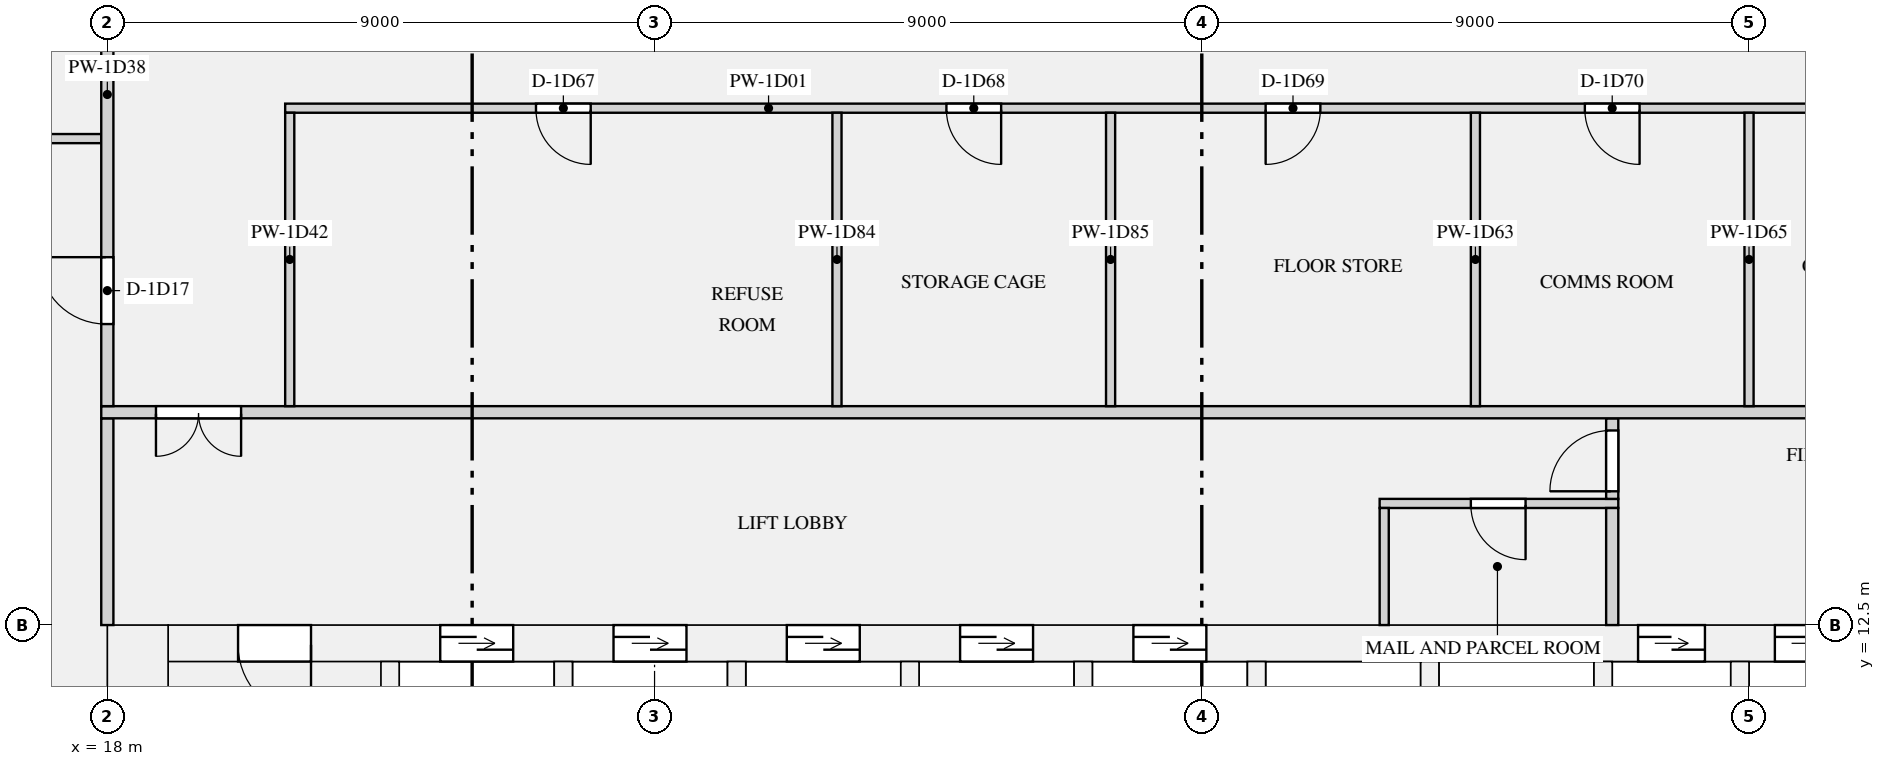
"""IFC4 building model, lengths in metres.
Left out: names, types, materials, properties, quantities, classifications, styles, units other than length and angle.
Written with IfcOpenShell. Run it as: python <this file> out.ifc"""

import sys

from ifc_helpers import new_model, si_unit, direction, frame, frame_2d, origin, place, context, subcontext, project, spatial, rectangle, extrude, element, fill, save


model = new_model("IFC4")
c1 = context("Model", 3, precision=1e-05, world=origin(), true_north=direction((0.0, 1.0)))
c2 = subcontext(c1, "Body", "Model", "MODEL_VIEW")
j1 = project(units=[si_unit("LENGTHUNIT", "METRE"), si_unit("PLANEANGLEUNIT", "RADIAN")], contexts=[c1])
p1 = place(None, origin())
s1 = spatial("IfcSite", under=j1, at=p1, CompositionType="ELEMENT")
p2 = place(p1, origin())
s2 = spatial("IfcBuilding", under=s1, at=p2, CompositionType="ELEMENT")
p3 = place(p2, frame((0.0, 0.0, 47.85)))
s3 = spatial("IfcBuildingStorey", under=s2, at=p3, CompositionType="ELEMENT", Elevation=47.85)
p4 = place(p3, frame((18.5, 0.0, 0.0), z_axis=(0.0, 0.0, 1.0), x_axis=(0.0, 1.0, 0.0)))
e1 = element("IfcWall", 1, at=p4, inside=s3, PredefinedType="SHEAR", context=c2, shape_type="SweptSolid", body=[
    extrude(rectangle(XDim=12.5, YDim=1.0, at=frame_2d((6.25, 0.0))), origin(), (0.0, 0.0, 1.0), 3.15),
])
p5 = place(p3, frame((19.0, 12.2, 0.0), z_axis=(0.0, 0.0, 1.0), x_axis=(1.0, 0.0, 0.0)))
e2 = element("IfcWall", 2, at=p5, inside=s3, PredefinedType="SHEAR", context=c2, shape_type="SweptSolid", body=[
    extrude(rectangle(XDim=34.0, YDim=0.6, at=frame_2d((17.0, 0.0))), origin(), (0.0, 0.0, 1.0), 3.15),
])
p6 = place(p5, frame((4.475, 0.0, 0.0)))
e3 = element("IfcOpeningElement", 3, at=p6, cuts=e2, PredefinedType="OPENING", context=c2, shape_type="SweptSolid", body=[
    extrude(rectangle(XDim=1.2, YDim=2.1, at=frame_2d((0.6, 1.05))), frame((0.0, 0.31, 0.0), z_axis=(0.0, -1.0, 0.0), x_axis=(1.0, 0.0, 0.0)), (0.0, 0.0, 1.0), 0.62),
])
p7 = place(p5, frame((7.325, 0.0, 0.0)))
e4 = element("IfcOpeningElement", 4, at=p7, cuts=e2, PredefinedType="OPENING", context=c2, shape_type="SweptSolid", body=[
    extrude(rectangle(XDim=1.2, YDim=2.1, at=frame_2d((0.6, 1.05))), frame((0.0, 0.31, 0.0), z_axis=(0.0, -1.0, 0.0), x_axis=(1.0, 0.0, 0.0)), (0.0, 0.0, 1.0), 0.62),
])
p8 = place(p5, frame((10.175, 0.0, 0.0)))
e5 = element("IfcOpeningElement", 5, at=p8, cuts=e2, PredefinedType="OPENING", context=c2, shape_type="SweptSolid", body=[
    extrude(rectangle(XDim=1.2, YDim=2.1, at=frame_2d((0.6, 1.05))), frame((0.0, 0.31, 0.0), z_axis=(0.0, -1.0, 0.0), x_axis=(1.0, 0.0, 0.0)), (0.0, 0.0, 1.0), 0.62),
])
p9 = place(p5, frame((13.025, 0.0, 0.0)))
e6 = element("IfcOpeningElement", 6, at=p9, cuts=e2, PredefinedType="OPENING", context=c2, shape_type="SweptSolid", body=[
    extrude(rectangle(XDim=1.2, YDim=2.1, at=frame_2d((0.6, 1.05))), frame((0.0, 0.31, 0.0), z_axis=(0.0, -1.0, 0.0), x_axis=(1.0, 0.0, 0.0)), (0.0, 0.0, 1.0), 0.62),
])
p10 = place(p5, frame((15.875, 0.0, 0.0)))
e7 = element("IfcOpeningElement", 7, at=p10, cuts=e2, PredefinedType="OPENING", context=c2, shape_type="SweptSolid", body=[
    extrude(rectangle(XDim=1.2, YDim=2.1, at=frame_2d((0.6, 1.05))), frame((0.0, 0.31, 0.0), z_axis=(0.0, -1.0, 0.0), x_axis=(1.0, 0.0, 0.0)), (0.0, 0.0, 1.0), 0.62),
])
p11 = place(p5, frame((24.175, 0.0, 0.0)))
e8 = element("IfcOpeningElement", 8, at=p11, cuts=e2, PredefinedType="OPENING", context=c2, shape_type="SweptSolid", body=[
    extrude(rectangle(XDim=1.1, YDim=2.1, at=frame_2d((0.55, 1.05))), frame((0.0, 0.31, 0.0), z_axis=(0.0, -1.0, 0.0), x_axis=(1.0, 0.0, 0.0)), (0.0, 0.0, 1.0), 0.62),
])
p12 = place(p5, frame((26.425, 0.0, 0.0)))
e9 = element("IfcOpeningElement", 9, at=p12, cuts=e2, PredefinedType="OPENING", context=c2, shape_type="SweptSolid", body=[
    extrude(rectangle(XDim=1.1, YDim=2.1, at=frame_2d((0.55, 1.05))), frame((0.0, 0.31, 0.0), z_axis=(0.0, -1.0, 0.0), x_axis=(1.0, 0.0, 0.0)), (0.0, 0.0, 1.0), 0.62),
])
p13 = place(p5, frame((28.675, 0.0, 0.0)))
e10 = element("IfcOpeningElement", 10, at=p13, cuts=e2, PredefinedType="OPENING", context=c2, shape_type="SweptSolid", body=[
    extrude(rectangle(XDim=1.1, YDim=2.1, at=frame_2d((0.55, 1.05))), frame((0.0, 0.31, 0.0), z_axis=(0.0, -1.0, 0.0), x_axis=(1.0, 0.0, 0.0)), (0.0, 0.0, 1.0), 0.62),
])
p14 = place(p5, frame((1.15, 0.0, 0.0)))
e11 = element("IfcOpeningElement", 11, at=p14, cuts=e2, PredefinedType="OPENING", context=c2, shape_type="SweptSolid", body=[
    extrude(rectangle(XDim=1.2, YDim=2.1, at=frame_2d((0.6, 1.05))), frame((0.0, 0.31, 0.0), z_axis=(0.0, -1.0, 0.0), x_axis=(1.0, 0.0, 0.0)), (0.0, 0.0, 1.0), 0.62),
])
p15 = place(p5, frame((31.65, 0.0, 0.0)))
e12 = element("IfcOpeningElement", 12, at=p15, cuts=e2, PredefinedType="OPENING", context=c2, shape_type="SweptSolid", body=[
    extrude(rectangle(XDim=1.2, YDim=2.1, at=frame_2d((0.6, 1.05))), frame((0.0, 0.31, 0.0), z_axis=(0.0, -1.0, 0.0), x_axis=(1.0, 0.0, 0.0)), (0.0, 0.0, 1.0), 0.62),
])
for number, where, z_axis, x_axis in (
    (13, (22.65, 9.35, 0.0), (0.0, 0.0, 1.0), (0.0, 1.0, 0.0)),
    (14, (25.5, 9.35, 0.0), (0.0, 0.0, 1.0), (0.0, 1.0, 0.0)),
    (15, (28.35, 9.35, 0.0), (0.0, 0.0, 1.0), (0.0, 1.0, 0.0)),
    (16, (31.2, 9.35, 0.0), (0.0, 0.0, 1.0), (0.0, 1.0, 0.0)),
    (17, (34.05, 9.35, 0.0), (0.0, 0.0, 1.0), (0.0, 1.0, 0.0)),
    (18, (36.9, 9.35, 0.0), (0.0, 0.0, 1.0), (0.0, 1.0, 0.0)),
    (19, (39.75, 9.35, 0.0), (0.0, 0.0, 1.0), (0.0, 1.0, 0.0)),
):
    element("IfcWall", number, at=place(p3, frame(where, z_axis=z_axis, x_axis=x_axis)), inside=s3, PredefinedType="SHEAR", context=c2, shape_type="SweptSolid", body=[
        extrude(rectangle(XDim=2.55, YDim=0.3, at=frame_2d((1.275, 0.0))), origin(), (0.0, 0.0, 1.0), 3.15),
    ])
for number, where, z_axis, x_axis in (
    (20, (42.6, 8.25, 0.0), (0.0, 0.0, 1.0), (0.0, 1.0, 0.0)),
    (21, (44.85, 8.25, 0.0), (0.0, 0.0, 1.0), (0.0, 1.0, 0.0)),
):
    element("IfcWall", number, at=place(p3, frame(where, z_axis=z_axis, x_axis=x_axis)), inside=s3, PredefinedType="SHEAR", context=c2, shape_type="SweptSolid", body=[
        extrude(rectangle(XDim=3.65, YDim=0.3, at=frame_2d((1.825, 0.0))), origin(), (0.0, 0.0, 1.0), 3.15),
    ])
p16 = place(p3, frame((38.925, 14.5, 0.0), z_axis=(0.0, 0.0, 1.0), x_axis=(1.0, 0.0, 0.0)))
e22 = element("IfcWall", 22, at=p16, inside=s3, PredefinedType="PARTITIONING", context=c2, shape_type="SweptSolid", body=[
    extrude(rectangle(XDim=3.925, YDim=0.15, at=frame_2d((1.962, 0.0))), origin(), (0.0, 0.0, 1.0), 2.83),
])
p17 = place(p16, frame((1.5, 0.0, 0.0)))
e23 = element("IfcOpeningElement", 23, at=p17, cuts=e22, PredefinedType="OPENING", context=c2, shape_type="SweptSolid", body=[
    extrude(rectangle(XDim=0.9, YDim=2.1, at=frame_2d((0.45, 1.05))), frame((0.0, 0.085, 0.0), z_axis=(0.0, -1.0, 0.0), x_axis=(1.0, 0.0, 0.0)), (0.0, 0.0, 1.0), 0.17),
])
p18 = place(p3, frame((18.0, 12.5, 0.0), z_axis=(0.0, 0.0, 1.0), x_axis=(0.0, 1.0, 0.0)))
e24 = element("IfcWall", 24, at=p18, inside=s3, PredefinedType="PARTITIONING", context=c2, shape_type="SweptSolid", body=[
    extrude(rectangle(XDim=3.4, YDim=0.2, at=frame_2d((1.7, 0.0))), origin(), (0.0, 0.0, 1.0), 2.83),
])
p19 = place(p3, frame((39.0, 12.5, 0.0), z_axis=(0.0, 0.0, 1.0), x_axis=(0.0, 1.0, 0.0)))
e25 = element("IfcWall", 25, at=p19, inside=s3, PredefinedType="PARTITIONING", context=c2, shape_type="SweptSolid", body=[
    extrude(rectangle(XDim=1.925, YDim=0.15, at=frame_2d((0.962, 0.0))), origin(), (0.0, 0.0, 1.0), 2.83),
])
p20 = place(p3, frame((42.75, 12.5, 0.0), z_axis=(0.0, 0.0, 1.0), x_axis=(0.0, 1.0, 0.0)))
e26 = element("IfcWall", 26, at=p20, inside=s3, PredefinedType="PARTITIONING", context=c2, shape_type="SweptSolid", body=[
    extrude(rectangle(XDim=1.925, YDim=0.2, at=frame_2d((0.962, 0.0))), origin(), (0.0, 0.0, 1.0), 2.83),
])
p21 = place(p3, frame((42.75, 14.575, 0.0), z_axis=(0.0, 0.0, 1.0), x_axis=(0.0, 1.0, 0.0)))
e27 = element("IfcWall", 27, at=p21, inside=s3, PredefinedType="PARTITIONING", context=c2, shape_type="SweptSolid", body=[
    extrude(rectangle(XDim=1.325, YDim=0.2, at=frame_2d((0.663, 0.0))), origin(), (0.0, 0.0, 1.0), 2.83),
])
p22 = place(p21, frame((0.125, 0.0, 0.0)))
e28 = element("IfcOpeningElement", 28, at=p22, cuts=e27, PredefinedType="OPENING", context=c2, shape_type="SweptSolid", body=[
    extrude(rectangle(XDim=1.0, YDim=2.1, at=frame_2d((0.5, 1.05))), frame((0.0, 0.11, 0.0), z_axis=(0.0, -1.0, 0.0), x_axis=(1.0, 0.0, 0.0)), (0.0, 0.0, 1.0), 0.22),
])
p23 = place(p3, frame((20.925, 21.0, 0.0), z_axis=(0.0, 0.0, 1.0), x_axis=(1.0, 0.0, 0.0)))
e29 = element("IfcWall", 29, at=p23, inside=s3, PredefinedType="PARTITIONING", context=c2, shape_type="SweptSolid", body=[
    extrude(rectangle(XDim=30.15, YDim=0.15, at=frame_2d((15.075, 0.0))), origin(), (0.0, 0.0, 1.0), 2.83),
])
p24 = place(p23, frame((4.125, 0.0, 0.0)))
e30 = element("IfcOpeningElement", 30, at=p24, cuts=e29, PredefinedType="OPENING", context=c2, shape_type="SweptSolid", body=[
    extrude(rectangle(XDim=0.9, YDim=2.1, at=frame_2d((0.45, 1.05))), frame((0.0, 0.085, 0.0), z_axis=(0.0, -1.0, 0.0), x_axis=(1.0, 0.0, 0.0)), (0.0, 0.0, 1.0), 0.17),
])
p25 = place(p23, frame((10.875, 0.0, 0.0)))
e31 = element("IfcOpeningElement", 31, at=p25, cuts=e29, PredefinedType="OPENING", context=c2, shape_type="SweptSolid", body=[
    extrude(rectangle(XDim=0.9, YDim=2.1, at=frame_2d((0.45, 1.05))), frame((0.0, 0.085, 0.0), z_axis=(0.0, -1.0, 0.0), x_axis=(1.0, 0.0, 0.0)), (0.0, 0.0, 1.0), 0.17),
])
p26 = place(p23, frame((16.125, 0.0, 0.0)))
e32 = element("IfcOpeningElement", 32, at=p26, cuts=e29, PredefinedType="OPENING", context=c2, shape_type="SweptSolid", body=[
    extrude(rectangle(XDim=0.9, YDim=2.1, at=frame_2d((0.45, 1.05))), frame((0.0, 0.085, 0.0), z_axis=(0.0, -1.0, 0.0), x_axis=(1.0, 0.0, 0.0)), (0.0, 0.0, 1.0), 0.17),
])
p27 = place(p23, frame((21.375, 0.0, 0.0)))
e33 = element("IfcOpeningElement", 33, at=p27, cuts=e29, PredefinedType="OPENING", context=c2, shape_type="SweptSolid", body=[
    extrude(rectangle(XDim=0.9, YDim=2.1, at=frame_2d((0.45, 1.05))), frame((0.0, 0.085, 0.0), z_axis=(0.0, -1.0, 0.0), x_axis=(1.0, 0.0, 0.0)), (0.0, 0.0, 1.0), 0.17),
])
p28 = place(p23, frame((26.625, 0.0, 0.0)))
e34 = element("IfcOpeningElement", 34, at=p28, cuts=e29, PredefinedType="OPENING", context=c2, shape_type="SweptSolid", body=[
    extrude(rectangle(XDim=0.9, YDim=2.1, at=frame_2d((0.45, 1.05))), frame((0.0, 0.085, 0.0), z_axis=(0.0, -1.0, 0.0), x_axis=(1.0, 0.0, 0.0)), (0.0, 0.0, 1.0), 0.17),
])
p29 = place(p3, frame((13.425, 20.5, 0.0), z_axis=(0.0, 0.0, 1.0), x_axis=(1.0, 0.0, 0.0)))
e35 = element("IfcWall", 35, at=p29, inside=s3, PredefinedType="PARTITIONING", context=c2, shape_type="SweptSolid", body=[
    extrude(rectangle(XDim=4.475, YDim=0.15, at=frame_2d((2.237, 0.0))), origin(), (0.0, 0.0, 1.0), 2.83),
])
p30 = place(p29, frame((1.875, 0.0, 0.0)))
e36 = element("IfcOpeningElement", 36, at=p30, cuts=e35, PredefinedType="OPENING", context=c2, shape_type="SweptSolid", body=[
    extrude(rectangle(XDim=0.9, YDim=2.1, at=frame_2d((0.45, 1.05))), frame((0.0, 0.085, 0.0), z_axis=(0.0, -1.0, 0.0), x_axis=(1.0, 0.0, 0.0)), (0.0, 0.0, 1.0), 0.17),
])
p31 = place(p3, frame((17.9, 16.0, 0.0), z_axis=(0.0, 0.0, 1.0), x_axis=(1.0, 0.0, 0.0)))
e37 = element("IfcWall", 37, at=p31, inside=s3, PredefinedType="PARTITIONING", context=c2, shape_type="SweptSolid", body=[
    extrude(rectangle(XDim=36.2, YDim=0.2, at=frame_2d((18.1, 0.0))), origin(), (0.0, 0.0, 1.0), 2.83),
])
p32 = place(p31, frame((0.9, 0.0, 0.0)))
e38 = element("IfcOpeningElement", 38, at=p32, cuts=e37, PredefinedType="OPENING", context=c2, shape_type="SweptSolid", body=[
    extrude(rectangle(XDim=1.4, YDim=2.1, at=frame_2d((0.7, 1.05))), frame((0.0, 0.11, 0.0), z_axis=(0.0, -1.0, 0.0), x_axis=(1.0, 0.0, 0.0)), (0.0, 0.0, 1.0), 0.22),
])
p33 = place(p31, frame((33.9, 0.0, 0.0)))
e39 = element("IfcOpeningElement", 39, at=p33, cuts=e37, PredefinedType="OPENING", context=c2, shape_type="SweptSolid", body=[
    extrude(rectangle(XDim=1.4, YDim=2.1, at=frame_2d((0.7, 1.05))), frame((0.0, 0.11, 0.0), z_axis=(0.0, -1.0, 0.0), x_axis=(1.0, 0.0, 0.0)), (0.0, 0.0, 1.0), 0.22),
])
p34 = place(p3, frame((18.0, 16.1, 0.0), z_axis=(0.0, 0.0, 1.0), x_axis=(0.0, 1.0, 0.0)))
e40 = element("IfcWall", 40, at=p34, inside=s3, PredefinedType="PARTITIONING", context=c2, shape_type="SweptSolid", body=[
    extrude(rectangle(XDim=7.8, YDim=0.2, at=frame_2d((3.9, 0.0))), origin(), (0.0, 0.0, 1.0), 2.83),
])
p35 = place(p34, frame((1.35, 0.0, 0.0)))
e41 = element("IfcOpeningElement", 41, at=p35, cuts=e40, PredefinedType="OPENING", context=c2, shape_type="SweptSolid", body=[
    extrude(rectangle(XDim=1.1, YDim=2.1, at=frame_2d((0.55, 1.05))), frame((0.0, 0.11, 0.0), z_axis=(0.0, -1.0, 0.0), x_axis=(1.0, 0.0, 0.0)), (0.0, 0.0, 1.0), 0.22),
])
for number, where, z_axis, x_axis in (
    (42, (21.0, 16.1, 0.0), (0.0, 0.0, 1.0), (0.0, 1.0, 0.0)),
    (43, (40.5, 16.1, 0.0), (0.0, 0.0, 1.0), (0.0, 1.0, 0.0)),
    (44, (45.0, 16.1, 0.0), (0.0, 0.0, 1.0), (0.0, 1.0, 0.0)),
    (45, (30.0, 16.1, 0.0), (0.0, 0.0, 1.0), (0.0, 1.0, 0.0)),
    (46, (34.5, 16.1, 0.0), (0.0, 0.0, 1.0), (0.0, 1.0, 0.0)),
):
    element("IfcWall", number, at=place(p3, frame(where, z_axis=z_axis, x_axis=x_axis)), inside=s3, PredefinedType="PARTITIONING", context=c2, shape_type="SweptSolid", body=[
        extrude(rectangle(XDim=4.825, YDim=0.15, at=frame_2d((2.413, 0.0))), origin(), (0.0, 0.0, 1.0), 2.83),
    ])
p36 = place(p6, origin())
e47 = element("IfcDoor", 47, at=p36, inside=s3, OperationType="DOUBLE_DOOR_SLIDING", PredefinedType="DOOR", context=c2, shape_type="SweptSolid", body=[
    extrude(rectangle(XDim=1.2, YDim=2.1, at=frame_2d((0.6, 1.05))), frame((0.0, 0.025, 0.0), z_axis=(0.0, -1.0, 0.0), x_axis=(1.0, 0.0, 0.0)), (0.0, 0.0, 1.0), 0.05),
])
fill(e3, e47)
p37 = place(p7, origin())
e48 = element("IfcDoor", 48, at=p37, inside=s3, OperationType="DOUBLE_DOOR_SLIDING", PredefinedType="DOOR", context=c2, shape_type="SweptSolid", body=[
    extrude(rectangle(XDim=1.2, YDim=2.1, at=frame_2d((0.6, 1.05))), frame((0.0, 0.025, 0.0), z_axis=(0.0, -1.0, 0.0), x_axis=(1.0, 0.0, 0.0)), (0.0, 0.0, 1.0), 0.05),
])
fill(e4, e48)
p38 = place(p8, origin())
e49 = element("IfcDoor", 49, at=p38, inside=s3, OperationType="DOUBLE_DOOR_SLIDING", PredefinedType="DOOR", context=c2, shape_type="SweptSolid", body=[
    extrude(rectangle(XDim=1.2, YDim=2.1, at=frame_2d((0.6, 1.05))), frame((0.0, 0.025, 0.0), z_axis=(0.0, -1.0, 0.0), x_axis=(1.0, 0.0, 0.0)), (0.0, 0.0, 1.0), 0.05),
])
fill(e5, e49)
p39 = place(p9, origin())
e50 = element("IfcDoor", 50, at=p39, inside=s3, OperationType="DOUBLE_DOOR_SLIDING", PredefinedType="DOOR", context=c2, shape_type="SweptSolid", body=[
    extrude(rectangle(XDim=1.2, YDim=2.1, at=frame_2d((0.6, 1.05))), frame((0.0, 0.025, 0.0), z_axis=(0.0, -1.0, 0.0), x_axis=(1.0, 0.0, 0.0)), (0.0, 0.0, 1.0), 0.05),
])
fill(e6, e50)
p40 = place(p10, origin())
e51 = element("IfcDoor", 51, at=p40, inside=s3, OperationType="DOUBLE_DOOR_SLIDING", PredefinedType="DOOR", context=c2, shape_type="SweptSolid", body=[
    extrude(rectangle(XDim=1.2, YDim=2.1, at=frame_2d((0.6, 1.05))), frame((0.0, 0.025, 0.0), z_axis=(0.0, -1.0, 0.0), x_axis=(1.0, 0.0, 0.0)), (0.0, 0.0, 1.0), 0.05),
])
fill(e7, e51)
p41 = place(p11, origin())
e52 = element("IfcDoor", 52, at=p41, inside=s3, OperationType="DOUBLE_DOOR_SLIDING", PredefinedType="DOOR", context=c2, shape_type="SweptSolid", body=[
    extrude(rectangle(XDim=1.1, YDim=2.1, at=frame_2d((0.55, 1.05))), frame((0.0, 0.025, 0.0), z_axis=(0.0, -1.0, 0.0), x_axis=(1.0, 0.0, 0.0)), (0.0, 0.0, 1.0), 0.05),
])
fill(e8, e52)
p42 = place(p12, origin())
e53 = element("IfcDoor", 53, at=p42, inside=s3, OperationType="DOUBLE_DOOR_SLIDING", PredefinedType="DOOR", context=c2, shape_type="SweptSolid", body=[
    extrude(rectangle(XDim=1.1, YDim=2.1, at=frame_2d((0.55, 1.05))), frame((0.0, 0.025, 0.0), z_axis=(0.0, -1.0, 0.0), x_axis=(1.0, 0.0, 0.0)), (0.0, 0.0, 1.0), 0.05),
])
fill(e9, e53)
p43 = place(p17, frame((0.9, 0.0, 0.0), z_axis=(0.0, 0.0, 1.0), x_axis=(-1.0, 0.0, 0.0)))
e54 = element("IfcDoor", 54, at=p43, inside=s3, OperationType="SINGLE_SWING_LEFT", PredefinedType="DOOR", context=c2, shape_type="SweptSolid", body=[
    extrude(rectangle(XDim=0.9, YDim=2.1, at=frame_2d((0.45, 1.05))), frame((0.0, 0.025, 0.0), z_axis=(0.0, -1.0, 0.0), x_axis=(1.0, 0.0, 0.0)), (0.0, 0.0, 1.0), 0.05),
])
fill(e23, e54)
p44 = place(p14, frame((1.2, 0.0, 0.0), z_axis=(0.0, 0.0, 1.0), x_axis=(-1.0, 0.0, 0.0)))
e55 = element("IfcDoor", 55, at=p44, inside=s3, OperationType="SINGLE_SWING_LEFT", PredefinedType="DOOR", context=c2, shape_type="SweptSolid", body=[
    extrude(rectangle(XDim=1.2, YDim=2.1, at=frame_2d((0.6, 1.05))), frame((0.0, 0.025, 0.0), z_axis=(0.0, -1.0, 0.0), x_axis=(1.0, 0.0, 0.0)), (0.0, 0.0, 1.0), 0.05),
])
fill(e11, e55)
p45 = place(p22, origin())
e56 = element("IfcDoor", 56, at=p45, inside=s3, OperationType="SINGLE_SWING_LEFT", PredefinedType="DOOR", context=c2, shape_type="SweptSolid", body=[
    extrude(rectangle(XDim=1.0, YDim=2.1, at=frame_2d((0.5, 1.05))), frame((0.0, 0.025, 0.0), z_axis=(0.0, -1.0, 0.0), x_axis=(1.0, 0.0, 0.0)), (0.0, 0.0, 1.0), 0.05),
])
fill(e28, e56)
p46 = place(p32, frame((1.4, 0.0, 0.0), z_axis=(0.0, 0.0, 1.0), x_axis=(-1.0, 0.0, 0.0)))
e57 = element("IfcDoor", 57, at=p46, inside=s3, OperationType="DOUBLE_DOOR_SINGLE_SWING", PredefinedType="DOOR", context=c2, shape_type="SweptSolid", body=[
    extrude(rectangle(XDim=1.4, YDim=2.1, at=frame_2d((0.7, 1.05))), frame((0.0, 0.025, 0.0), z_axis=(0.0, -1.0, 0.0), x_axis=(1.0, 0.0, 0.0)), (0.0, 0.0, 1.0), 0.05),
])
fill(e38, e57)
p47 = place(p35, origin())
e58 = element("IfcDoor", 58, at=p47, inside=s3, OperationType="SINGLE_SWING_RIGHT", PredefinedType="DOOR", context=c2, shape_type="SweptSolid", body=[
    extrude(rectangle(XDim=1.1, YDim=2.1, at=frame_2d((0.55, 1.05))), frame((0.0, 0.025, 0.0), z_axis=(0.0, -1.0, 0.0), x_axis=(1.0, 0.0, 0.0)), (0.0, 0.0, 1.0), 0.05),
])
fill(e41, e58)
p48 = place(p24, frame((0.9, 0.0, 0.0), z_axis=(0.0, 0.0, 1.0), x_axis=(-1.0, 0.0, 0.0)))
e59 = element("IfcDoor", 59, at=p48, inside=s3, OperationType="SINGLE_SWING_LEFT", PredefinedType="DOOR", context=c2, shape_type="SweptSolid", body=[
    extrude(rectangle(XDim=0.9, YDim=2.1, at=frame_2d((0.45, 1.05))), frame((0.0, 0.025, 0.0), z_axis=(0.0, -1.0, 0.0), x_axis=(1.0, 0.0, 0.0)), (0.0, 0.0, 1.0), 0.05),
])
fill(e30, e59)
p49 = place(p25, frame((0.9, 0.0, 0.0), z_axis=(0.0, 0.0, 1.0), x_axis=(-1.0, 0.0, 0.0)))
e60 = element("IfcDoor", 60, at=p49, inside=s3, OperationType="SINGLE_SWING_LEFT", PredefinedType="DOOR", context=c2, shape_type="SweptSolid", body=[
    extrude(rectangle(XDim=0.9, YDim=2.1, at=frame_2d((0.45, 1.05))), frame((0.0, 0.025, 0.0), z_axis=(0.0, -1.0, 0.0), x_axis=(1.0, 0.0, 0.0)), (0.0, 0.0, 1.0), 0.05),
])
fill(e31, e60)
p50 = place(p26, frame((0.9, 0.0, 0.0), z_axis=(0.0, 0.0, 1.0), x_axis=(-1.0, 0.0, 0.0)))
e61 = element("IfcDoor", 61, at=p50, inside=s3, OperationType="SINGLE_SWING_RIGHT", PredefinedType="DOOR", context=c2, shape_type="SweptSolid", body=[
    extrude(rectangle(XDim=0.9, YDim=2.1, at=frame_2d((0.45, 1.05))), frame((0.0, 0.025, 0.0), z_axis=(0.0, -1.0, 0.0), x_axis=(1.0, 0.0, 0.0)), (0.0, 0.0, 1.0), 0.05),
])
fill(e32, e61)
p51 = place(p27, frame((0.9, 0.0, 0.0), z_axis=(0.0, 0.0, 1.0), x_axis=(-1.0, 0.0, 0.0)))
e62 = element("IfcDoor", 62, at=p51, inside=s3, OperationType="SINGLE_SWING_LEFT", PredefinedType="DOOR", context=c2, shape_type="SweptSolid", body=[
    extrude(rectangle(XDim=0.9, YDim=2.1, at=frame_2d((0.45, 1.05))), frame((0.0, 0.025, 0.0), z_axis=(0.0, -1.0, 0.0), x_axis=(1.0, 0.0, 0.0)), (0.0, 0.0, 1.0), 0.05),
])
fill(e33, e62)
save(model, sys.argv[1])
